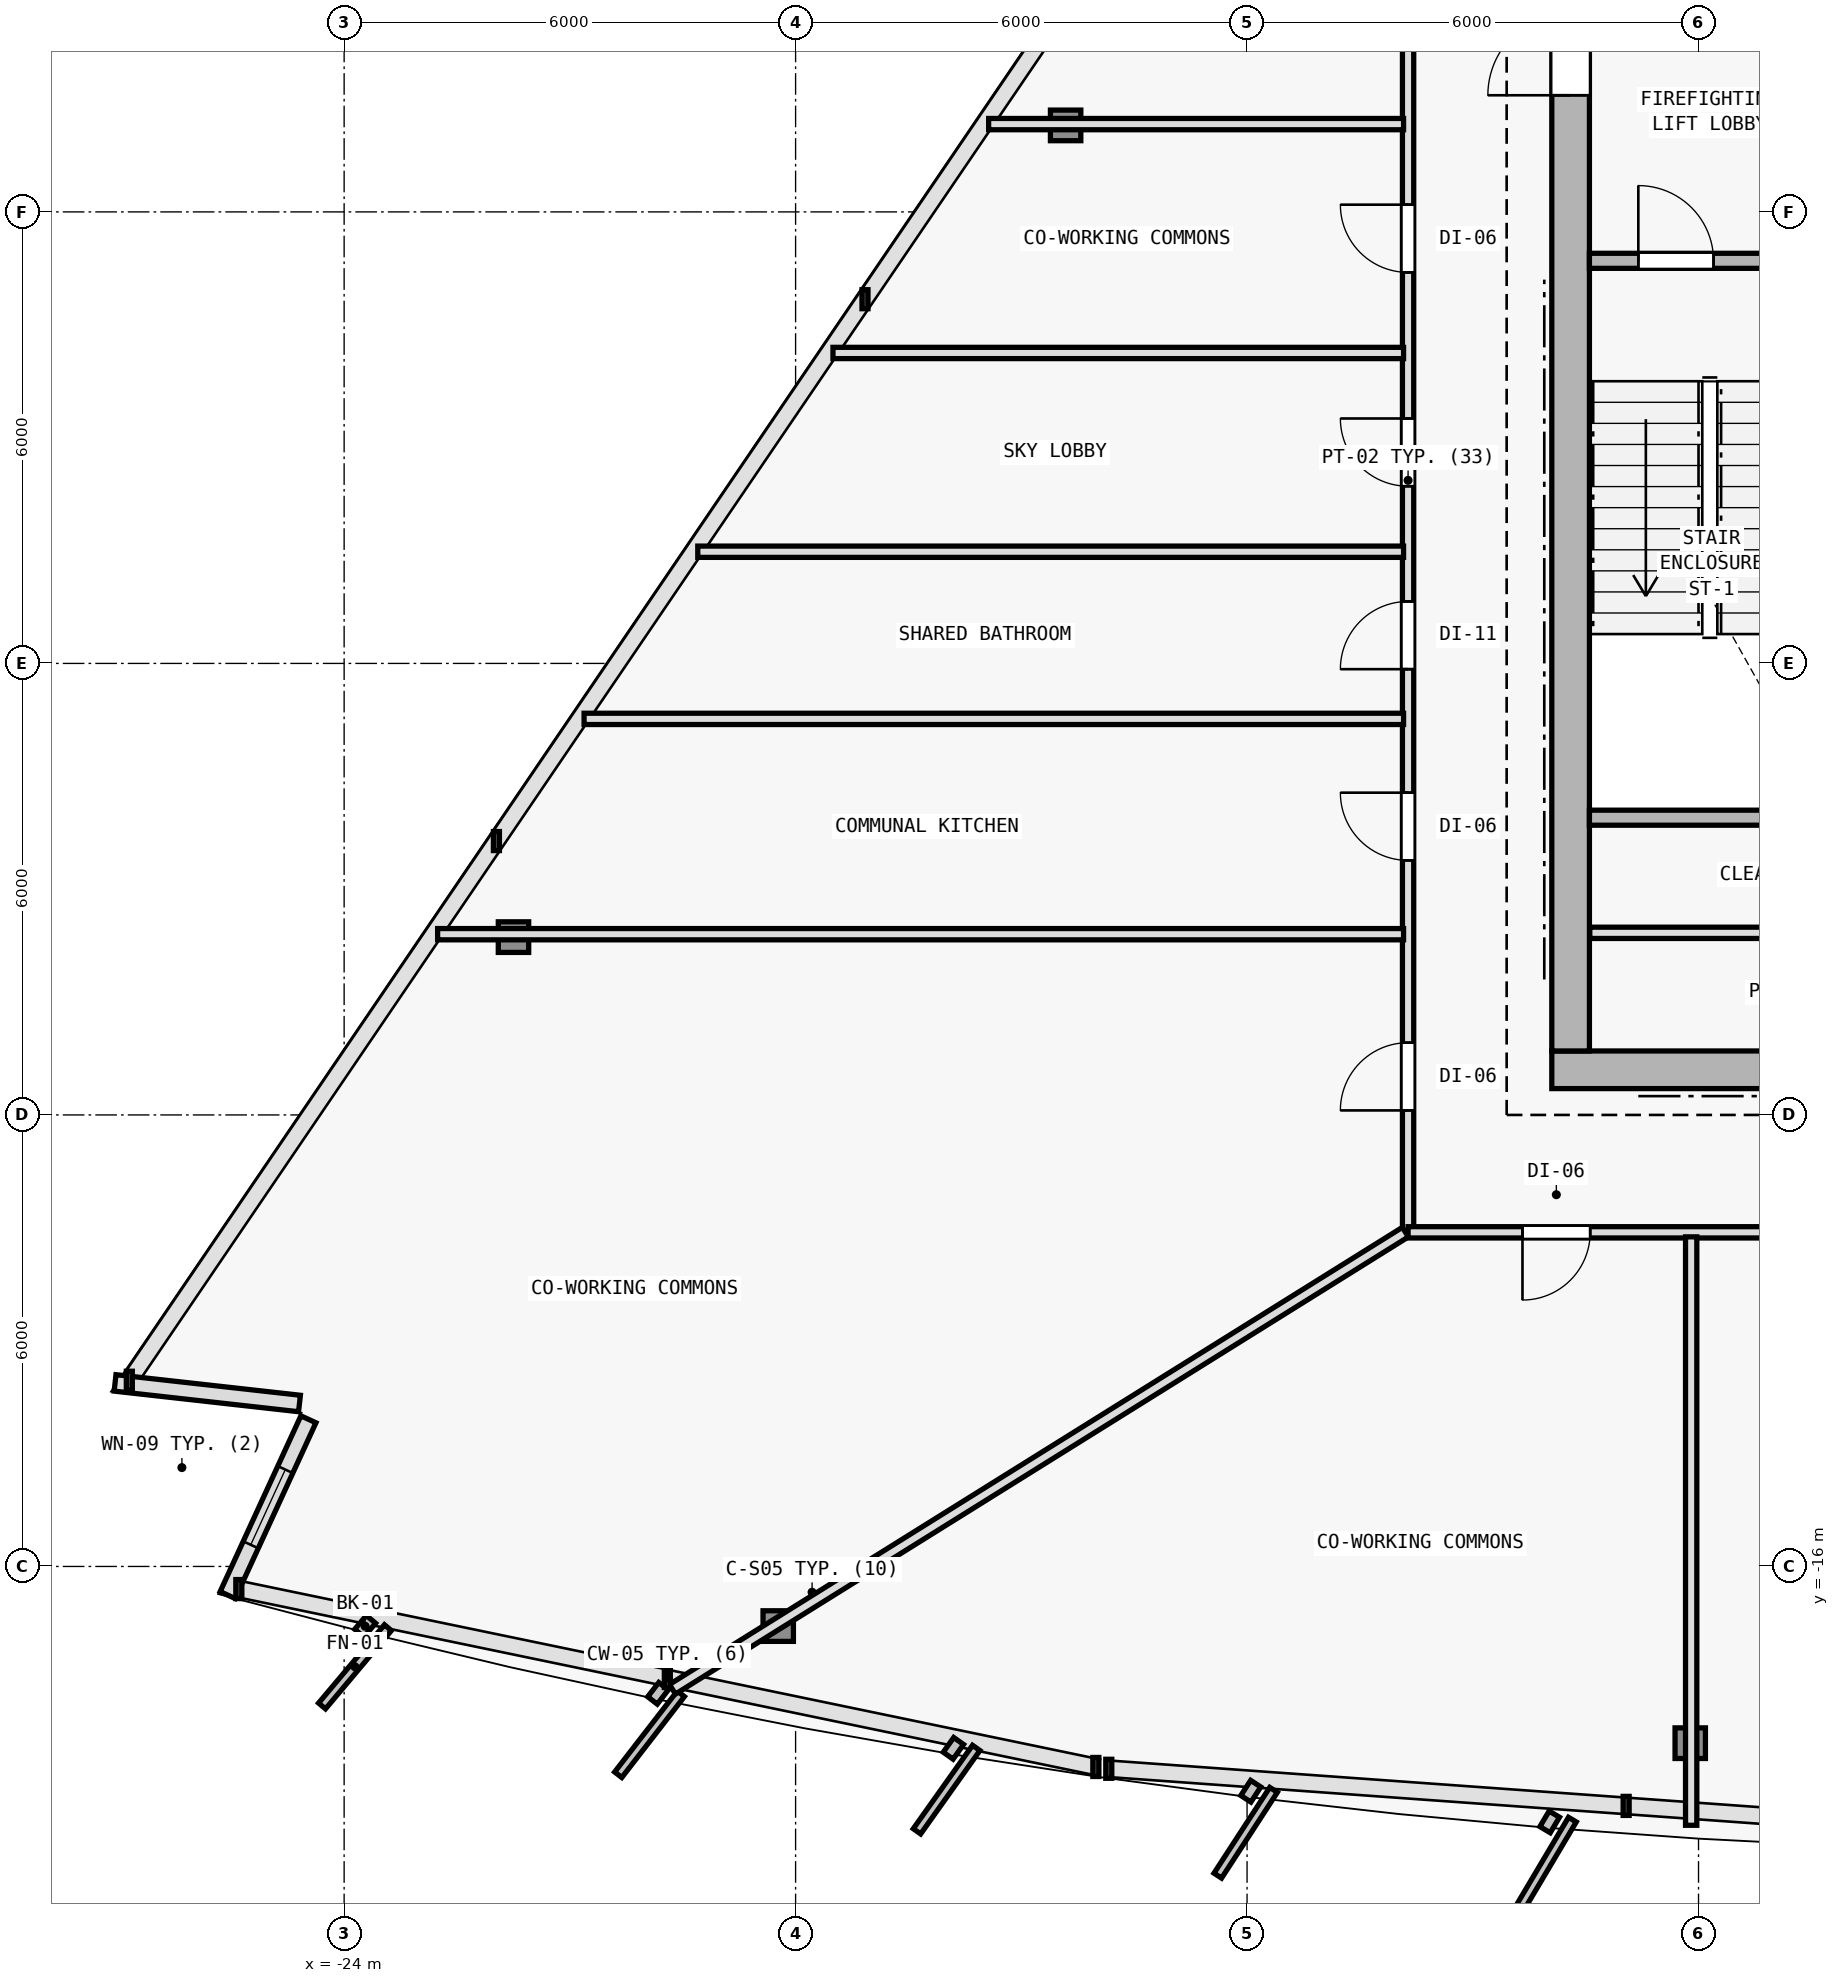
"""IFC4 building model, lengths in metres.
Left out: names, types, materials, properties, quantities, classifications, styles, units other than length and angle.
Written with IfcOpenShell. Run it as: python <this file> out.ifc"""

import sys

from ifc_helpers import new_model, si_unit, direction, frame, frame_2d, origin, origin_2d, place, context, subcontext, project, spatial, rectangle, i_section, extrude, element, fill, save


model = new_model("IFC4")
c1 = context("Model", 3, precision=1e-05, world=origin(), true_north=direction((0.0, 1.0)))
c2 = subcontext(c1, "Body", "Model", "MODEL_VIEW")
j1 = project(units=[si_unit("LENGTHUNIT", "METRE"), si_unit("PLANEANGLEUNIT", "RADIAN")], contexts=[c1])
p1 = place(None, origin())
s1 = spatial("IfcSite", under=j1, at=p1, CompositionType="ELEMENT")
p2 = place(p1, origin())
s2 = spatial("IfcBuilding", under=s1, at=p2, CompositionType="ELEMENT")
p3 = place(p2, frame((0.0, 0.0, 134.1)))
s3 = spatial("IfcBuildingStorey", under=s2, at=p3, CompositionType="ELEMENT", Elevation=134.1)
for number, where, z_axis, x_axis in (
    (1, (-7.7, -9.4, 0.0), (0.0, 0.0, 1.0), (1.0, 0.0, 0.0)),
    (2, (-7.7, 2.0, 0.0), (0.0, 0.0, 1.0), (1.0, 0.0, 0.0)),
):
    element("IfcColumn", number, at=place(p3, frame(where, z_axis=z_axis, x_axis=x_axis)), inside=s3, PredefinedType="COLUMN", context=c2, shape_type="SweptSolid", body=[
        extrude(i_section(OverallWidth=0.409, OverallDepth=0.425, WebThickness=0.021, FlangeThickness=0.034, FilletRadius=0.015, at=origin_2d()), origin(), (0.0, 0.0, 1.0), 4.5),
    ])
p4 = place(p3, frame((-18.231, -16.792, 0.005), z_axis=(0.016470903178, 0.026744832884, 0.999506589904), x_axis=(-0.851480003019, 0.52438707503, 0.0)))
e3 = element("IfcColumn", 3, at=p4, inside=s3, PredefinedType="COLUMN", context=c2, shape_type="SweptSolid", body=[
    extrude(i_section(OverallWidth=0.404, OverallDepth=0.407, WebThickness=0.017, FlangeThickness=0.028, FilletRadius=0.015, at=origin_2d()), origin(), (0.0, 0.0, 1.0), 4.491),
])
p5 = place(p3, frame((-6.11, -18.348, 0.005), z_axis=(0.005545112284, 0.028160472186, 0.99958803491), x_axis=(-0.981159154887, 0.193201223549, 0.0)))
e4 = element("IfcColumn", 4, at=p5, inside=s3, PredefinedType="COLUMN", context=c2, shape_type="SweptSolid", body=[
    extrude(i_section(OverallWidth=0.404, OverallDepth=0.407, WebThickness=0.017, FlangeThickness=0.028, FilletRadius=0.015, at=origin_2d()), origin(), (0.0, 0.0, 1.0), 4.491),
])
p6 = place(p3, frame((-14.411, 3.15, 0.005), z_axis=(0.013649281728, 0.007613145187, 0.999877861105), x_axis=(-0.487119351792, 0.873335409284, 0.0)))
e5 = element("IfcColumn", 5, at=p6, inside=s3, PredefinedType="COLUMN", context=c2, shape_type="SweptSolid", body=[
    extrude(i_section(OverallWidth=0.404, OverallDepth=0.407, WebThickness=0.017, FlangeThickness=0.028, FilletRadius=0.015, at=origin_2d()), origin(), (0.0, 0.0, 1.0), 4.49),
])
p7 = place(p3, frame((-21.749, -7.637, 0.005), z_axis=(0.020170177998, 0.017288723999, 0.999647069691), x_axis=(-0.650791373456, 0.759256602365, 0.0)))
e6 = element("IfcColumn", 6, at=p7, inside=s3, PredefinedType="COLUMN", context=c2, shape_type="SweptSolid", body=[
    extrude(i_section(OverallWidth=0.404, OverallDepth=0.407, WebThickness=0.017, FlangeThickness=0.028, FilletRadius=0.015, at=origin_2d()), origin(), (0.0, 0.0, 1.0), 4.49),
])
p8 = place(p3, frame((-24.594, -13.834, 0.0), z_axis=(0.0, 0.0, 1.0), x_axis=(-0.993823222634, 0.110974781609, 0.0)))
e7 = element("IfcWall", 7, at=p8, inside=s3, PredefinedType="SOLIDWALL", context=c2, shape_type="SweptSolid", body=[
    extrude(rectangle(XDim=2.466, YDim=0.22, at=frame_2d((1.233, 0.0))), origin(), (0.0, 0.0, 1.0), 4.25),
])
p9 = place(p3, frame((-25.548, -16.38, 0.0), z_axis=(0.0, 0.0, 1.0), x_axis=(0.417449299542, 0.908700215864, 0.0)))
e8 = element("IfcWall", 8, at=p9, inside=s3, PredefinedType="SOLIDWALL", context=c2, shape_type="SweptSolid", body=[
    extrude(rectangle(XDim=2.57, YDim=0.22, at=frame_2d((1.285, 0.0))), origin(), (0.0, 0.0, 1.0), 4.25),
])
p10 = place(p9, frame((0.735, 0.0, 0.62)))
e9 = element("IfcOpeningElement", 9, at=p10, cuts=e8, PredefinedType="OPENING", context=c2, shape_type="SweptSolid", body=[
    extrude(rectangle(XDim=1.1, YDim=1.8, at=frame_2d((0.55, 0.9))), frame((0.0, 0.12, 0.0), z_axis=(0.0, -1.0, 0.0), x_axis=(1.0, 0.0, 0.0)), (0.0, 0.0, 1.0), 0.24),
])
p11 = place(p3, frame((-7.95, -9.4, 0.0), z_axis=(0.0, 0.0, 1.0), x_axis=(1.0, 0.0, 0.0)))
e10 = element("IfcWall", 10, at=p11, inside=s3, PredefinedType="SHEAR", context=c2, shape_type="SweptSolid", body=[
    extrude(rectangle(XDim=15.9, YDim=0.5, at=frame_2d((7.95, 0.0))), origin(), (0.0, 0.0, 1.0), 4.25),
])
p12 = place(p11, frame((9.6, 0.0, 0.0)))
e11 = element("IfcOpeningElement", 11, at=p12, cuts=e10, PredefinedType="OPENING", context=c2, shape_type="SweptSolid", body=[
    extrude(rectangle(XDim=1.5, YDim=2.2, at=frame_2d((0.75, 1.1))), frame((0.0, 0.26, 0.0), z_axis=(0.0, -1.0, 0.0), x_axis=(1.0, 0.0, 0.0)), (0.0, 0.0, 1.0), 0.52),
])
p13 = place(p3, frame((-7.7, -9.15, 0.0), z_axis=(0.0, 0.0, 1.0), x_axis=(0.0, 1.0, 0.0)))
e12 = element("IfcWall", 12, at=p13, inside=s3, PredefinedType="SHEAR", context=c2, shape_type="SweptSolid", body=[
    extrude(rectangle(XDim=19.1, YDim=0.5, at=frame_2d((9.55, 0.0))), origin(), (0.0, 0.0, 1.0), 4.25),
])
p14 = place(p13, frame((12.7, 0.0, 0.0)))
e13 = element("IfcOpeningElement", 13, at=p14, cuts=e12, PredefinedType="OPENING", context=c2, shape_type="SweptSolid", body=[
    extrude(rectangle(XDim=1.1, YDim=2.15, at=frame_2d((0.55, 1.075))), frame((0.0, 0.26, 0.0), z_axis=(0.0, -1.0, 0.0), x_axis=(1.0, 0.0, 0.0)), (0.0, 0.0, 1.0), 0.52),
])
p15 = place(p3, frame((-7.45, 1.35, 0.0), z_axis=(0.0, 0.0, 1.0), x_axis=(1.0, 0.0, 0.0)))
e14 = element("IfcWall", 14, at=p15, inside=s3, PredefinedType="SOLIDWALL", context=c2, shape_type="SweptSolid", body=[
    extrude(rectangle(XDim=3.4, YDim=0.2, at=frame_2d((1.7, 0.0))), origin(), (0.0, 0.0, 1.0), 4.25),
])
p16 = place(p15, frame((0.65, 0.0, 0.0)))
e15 = element("IfcOpeningElement", 15, at=p16, cuts=e14, PredefinedType="OPENING", context=c2, shape_type="SweptSolid", body=[
    extrude(rectangle(XDim=1.0, YDim=2.15, at=frame_2d((0.5, 1.075))), frame((0.0, 0.11, 0.0), z_axis=(0.0, -1.0, 0.0), x_axis=(1.0, 0.0, 0.0)), (0.0, 0.0, 1.0), 0.22),
])
p17 = place(p3, frame((-7.45, -6.05, 0.0), z_axis=(0.0, 0.0, 1.0), x_axis=(1.0, 0.0, 0.0)))
e16 = element("IfcWall", 16, at=p17, inside=s3, PredefinedType="SOLIDWALL", context=c2, shape_type="SweptSolid", body=[
    extrude(rectangle(XDim=3.4, YDim=0.2, at=frame_2d((1.7, 0.0))), origin(), (0.0, 0.0, 1.0), 4.25),
])
p18 = place(p3, frame((-7.445, -7.58, 0.0), z_axis=(0.0, 0.0, 1.0), x_axis=(1.0, 0.0, 0.0)))
e17 = element("IfcWall", 17, at=p18, inside=s3, PredefinedType="PARTITIONING", context=c2, shape_type="SweptSolid", body=[
    extrude(rectangle(XDim=6.195, YDim=0.15, at=frame_2d((3.098, 0.0))), origin(), (0.0, 0.0, 1.0), 4.25),
])
p19 = place(p3, frame((-9.86, -11.56, 0.0), z_axis=(0.0, 0.0, 1.0), x_axis=(0.0, 1.0, 0.0)))
e18 = element("IfcWall", 18, at=p19, inside=s3, PredefinedType="PARTITIONING", context=c2, shape_type="SweptSolid", body=[
    extrude(rectangle(XDim=19.986, YDim=0.15, at=frame_2d((9.993, 0.0))), origin(), (0.0, 0.0, 1.0), 3.675),
])
p20 = place(p19, frame((9.915, 0.0, 0.0)))
e19 = element("IfcOpeningElement", 19, at=p20, cuts=e18, PredefinedType="OPENING", context=c2, shape_type="SweptSolid", body=[
    extrude(rectangle(XDim=0.9, YDim=2.1, at=frame_2d((0.45, 1.05))), frame((0.0, 0.085, 0.0), z_axis=(0.0, -1.0, 0.0), x_axis=(1.0, 0.0, 0.0)), (0.0, 0.0, 1.0), 0.17),
])
p21 = place(p19, frame((7.484, 0.0, 0.0)))
e20 = element("IfcOpeningElement", 20, at=p21, cuts=e18, PredefinedType="OPENING", context=c2, shape_type="SweptSolid", body=[
    extrude(rectangle(XDim=0.9, YDim=2.1, at=frame_2d((0.45, 1.05))), frame((0.0, 0.085, 0.0), z_axis=(0.0, -1.0, 0.0), x_axis=(1.0, 0.0, 0.0)), (0.0, 0.0, 1.0), 0.17),
])
p22 = place(p19, frame((4.942, 0.0, 0.0)))
e21 = element("IfcOpeningElement", 21, at=p22, cuts=e18, PredefinedType="OPENING", context=c2, shape_type="SweptSolid", body=[
    extrude(rectangle(XDim=0.9, YDim=2.1, at=frame_2d((0.45, 1.05))), frame((0.0, 0.085, 0.0), z_axis=(0.0, -1.0, 0.0), x_axis=(1.0, 0.0, 0.0)), (0.0, 0.0, 1.0), 0.17),
])
p23 = place(p19, frame((1.62, 0.0, 0.0)))
e22 = element("IfcOpeningElement", 22, at=p23, cuts=e18, PredefinedType="OPENING", context=c2, shape_type="SweptSolid", body=[
    extrude(rectangle(XDim=0.9, YDim=2.1, at=frame_2d((0.45, 1.05))), frame((0.0, 0.085, 0.0), z_axis=(0.0, -1.0, 0.0), x_axis=(1.0, 0.0, 0.0)), (0.0, 0.0, 1.0), 0.17),
])
p24 = place(p19, frame((12.756, 0.0, 0.0)))
e23 = element("IfcOpeningElement", 23, at=p24, cuts=e18, PredefinedType="OPENING", context=c2, shape_type="SweptSolid", body=[
    extrude(rectangle(XDim=0.9, YDim=2.1, at=frame_2d((0.45, 1.05))), frame((0.0, 0.085, 0.0), z_axis=(0.0, -1.0, 0.0), x_axis=(1.0, 0.0, 0.0)), (0.0, 0.0, 1.0), 0.17),
])
p25 = place(p3, frame((13.18, -11.56, 0.0), z_axis=(0.0, 0.0, 1.0), x_axis=(-1.0, 0.0, 0.0)))
e24 = element("IfcWall", 24, at=p25, inside=s3, PredefinedType="PARTITIONING", context=c2, shape_type="SweptSolid", body=[
    extrude(rectangle(XDim=23.04, YDim=0.15, at=frame_2d((11.52, 0.0))), origin(), (0.0, 0.0, 1.0), 3.675),
])
p26 = place(p25, frame((20.62, 0.0, 0.0)))
e25 = element("IfcOpeningElement", 25, at=p26, cuts=e24, PredefinedType="OPENING", context=c2, shape_type="SweptSolid", body=[
    extrude(rectangle(XDim=0.9, YDim=2.1, at=frame_2d((0.45, 1.05))), frame((0.0, 0.085, 0.0), z_axis=(0.0, -1.0, 0.0), x_axis=(1.0, 0.0, 0.0)), (0.0, 0.0, 1.0), 0.17),
])
p27 = place(p25, frame((9.278, 0.0, 0.0)))
e26 = element("IfcOpeningElement", 26, at=p27, cuts=e24, PredefinedType="OPENING", context=c2, shape_type="SweptSolid", body=[
    extrude(rectangle(XDim=0.9, YDim=2.1, at=frame_2d((0.45, 1.05))), frame((0.0, 0.085, 0.0), z_axis=(0.0, -1.0, 0.0), x_axis=(1.0, 0.0, 0.0)), (0.0, 0.0, 1.0), 0.17),
])
p28 = place(p3, frame((-9.896, -11.558, 0.0), z_axis=(0.0, 0.0, 1.0), x_axis=(-0.848533171775, -0.529142189206, 0.0)))
e27 = element("IfcWall", 27, at=p28, inside=s3, PredefinedType="PARTITIONING", context=c2, shape_type="SweptSolid", body=[
    extrude(rectangle(XDim=11.479, YDim=0.15, at=frame_2d((5.74, 0.0))), origin(), (0.0, 0.0, 1.0), 3.625),
])
p29 = place(p3, frame((-6.098, -11.62, 0.0), z_axis=(0.0, 0.0, 1.0), x_axis=(0.0, -1.0, 0.0)))
e28 = element("IfcWall", 28, at=p29, inside=s3, PredefinedType="PARTITIONING", context=c2, shape_type="SweptSolid", body=[
    extrude(rectangle(XDim=7.819, YDim=0.15, at=frame_2d((3.91, 0.0))), origin(), (0.0, 0.0, 1.0), 3.625),
])
p30 = place(p3, frame((-9.92, 3.167, 0.0), z_axis=(0.0, 0.0, 1.0), x_axis=(-1.0, 0.0, 0.0)))
e29 = element("IfcWall", 29, at=p30, inside=s3, PredefinedType="PARTITIONING", context=c2, shape_type="SweptSolid", body=[
    extrude(rectangle(XDim=5.514, YDim=0.15, at=frame_2d((2.757, 0.0))), origin(), (0.0, 0.0, 1.0), 3.785),
])
p31 = place(p3, frame((-9.92, -7.598, 0.0), z_axis=(0.0, 0.0, 1.0), x_axis=(-1.0, 0.0, 0.0)))
e30 = element("IfcWall", 30, at=p31, inside=s3, PredefinedType="PARTITIONING", context=c2, shape_type="SweptSolid", body=[
    extrude(rectangle(XDim=12.838, YDim=0.15, at=frame_2d((6.419, 0.0))), origin(), (0.0, 0.0, 1.0), 3.625),
])
p32 = place(p3, frame((-9.92, -2.516, 0.0), z_axis=(0.0, 0.0, 1.0), x_axis=(-1.0, 0.0, 0.0)))
e31 = element("IfcWall", 31, at=p32, inside=s3, PredefinedType="PARTITIONING", context=c2, shape_type="SweptSolid", body=[
    extrude(rectangle(XDim=9.38, YDim=0.15, at=frame_2d((4.69, 0.0))), origin(), (0.0, 0.0, 1.0), 3.625),
])
p33 = place(p3, frame((-9.92, 0.125, 0.0), z_axis=(0.0, 0.0, 1.0), x_axis=(-1.0, 0.0, 0.0)))
e32 = element("IfcWall", 32, at=p33, inside=s3, PredefinedType="PARTITIONING", context=c2, shape_type="SweptSolid", body=[
    extrude(rectangle(XDim=7.583, YDim=0.15, at=frame_2d((3.792, 0.0))), origin(), (0.0, 0.0, 1.0), 3.625),
])
p34 = place(p3, frame((-9.92, -4.737, 0.0), z_axis=(0.0, 0.0, 1.0), x_axis=(-1.0, 0.0, 0.0)))
e33 = element("IfcWall", 33, at=p34, inside=s3, PredefinedType="PARTITIONING", context=c2, shape_type="SweptSolid", body=[
    extrude(rectangle(XDim=10.891, YDim=0.15, at=frame_2d((5.446, 0.0))), origin(), (0.0, 0.0, 1.0), 3.625),
])
p35 = place(p10, origin())
e34 = element("IfcWindow", 34, at=p35, inside=s3, PartitioningType="SINGLE_PANEL", PredefinedType="WINDOW", context=c2, shape_type="SweptSolid", body=[
    extrude(rectangle(XDim=1.1, YDim=1.8, at=frame_2d((0.55, 0.9))), frame((0.0, 0.03, 0.0), z_axis=(0.0, -1.0, 0.0), x_axis=(1.0, 0.0, 0.0)), (0.0, 0.0, 1.0), 0.06),
])
fill(e9, e34)
p36 = place(p14, origin())
e35 = element("IfcDoor", 35, at=p36, inside=s3, OperationType="SINGLE_SWING_LEFT", PredefinedType="DOOR", context=c2, shape_type="SweptSolid", body=[
    extrude(rectangle(XDim=1.1, YDim=2.15, at=frame_2d((0.55, 1.075))), frame((0.0, 0.025, 0.0), z_axis=(0.0, -1.0, 0.0), x_axis=(1.0, 0.0, 0.0)), (0.0, 0.0, 1.0), 0.05),
])
fill(e13, e35)
p37 = place(p16, origin())
e36 = element("IfcDoor", 36, at=p37, inside=s3, OperationType="SINGLE_SWING_LEFT", PredefinedType="DOOR", context=c2, shape_type="SweptSolid", body=[
    extrude(rectangle(XDim=1.0, YDim=2.15, at=frame_2d((0.5, 1.075))), frame((0.0, 0.025, 0.0), z_axis=(0.0, -1.0, 0.0), x_axis=(1.0, 0.0, 0.0)), (0.0, 0.0, 1.0), 0.05),
])
fill(e15, e36)
p38 = place(p20, origin())
e37 = element("IfcDoor", 37, at=p38, inside=s3, OperationType="SINGLE_SWING_RIGHT", PredefinedType="DOOR", context=c2, shape_type="SweptSolid", body=[
    extrude(rectangle(XDim=0.9, YDim=2.1, at=frame_2d((0.45, 1.05))), frame((0.0, 0.025, 0.0), z_axis=(0.0, -1.0, 0.0), x_axis=(1.0, 0.0, 0.0)), (0.0, 0.0, 1.0), 0.05),
])
fill(e19, e37)
p39 = place(p21, origin())
e38 = element("IfcDoor", 38, at=p39, inside=s3, OperationType="SINGLE_SWING_LEFT", PredefinedType="DOOR", context=c2, shape_type="SweptSolid", body=[
    extrude(rectangle(XDim=0.9, YDim=2.1, at=frame_2d((0.45, 1.05))), frame((0.0, 0.025, 0.0), z_axis=(0.0, -1.0, 0.0), x_axis=(1.0, 0.0, 0.0)), (0.0, 0.0, 1.0), 0.05),
])
fill(e20, e38)
p40 = place(p22, origin())
e39 = element("IfcDoor", 39, at=p40, inside=s3, OperationType="SINGLE_SWING_RIGHT", PredefinedType="DOOR", context=c2, shape_type="SweptSolid", body=[
    extrude(rectangle(XDim=0.9, YDim=2.1, at=frame_2d((0.45, 1.05))), frame((0.0, 0.025, 0.0), z_axis=(0.0, -1.0, 0.0), x_axis=(1.0, 0.0, 0.0)), (0.0, 0.0, 1.0), 0.05),
])
fill(e21, e39)
p41 = place(p23, origin())
e40 = element("IfcDoor", 40, at=p41, inside=s3, OperationType="SINGLE_SWING_LEFT", PredefinedType="DOOR", context=c2, shape_type="SweptSolid", body=[
    extrude(rectangle(XDim=0.9, YDim=2.1, at=frame_2d((0.45, 1.05))), frame((0.0, 0.025, 0.0), z_axis=(0.0, -1.0, 0.0), x_axis=(1.0, 0.0, 0.0)), (0.0, 0.0, 1.0), 0.05),
])
fill(e22, e40)
p42 = place(p26, origin())
e41 = element("IfcDoor", 41, at=p42, inside=s3, OperationType="SINGLE_SWING_RIGHT", PredefinedType="DOOR", context=c2, shape_type="SweptSolid", body=[
    extrude(rectangle(XDim=0.9, YDim=2.1, at=frame_2d((0.45, 1.05))), frame((0.0, 0.025, 0.0), z_axis=(0.0, -1.0, 0.0), x_axis=(1.0, 0.0, 0.0)), (0.0, 0.0, 1.0), 0.05),
])
fill(e25, e41)
p43 = place(p24, origin())
e42 = element("IfcDoor", 42, at=p43, inside=s3, OperationType="SINGLE_SWING_RIGHT", PredefinedType="DOOR", context=c2, shape_type="SweptSolid", body=[
    extrude(rectangle(XDim=0.9, YDim=2.1, at=frame_2d((0.45, 1.05))), frame((0.0, 0.025, 0.0), z_axis=(0.0, -1.0, 0.0), x_axis=(1.0, 0.0, 0.0)), (0.0, 0.0, 1.0), 0.05),
])
fill(e23, e42)
save(model, sys.argv[1])
